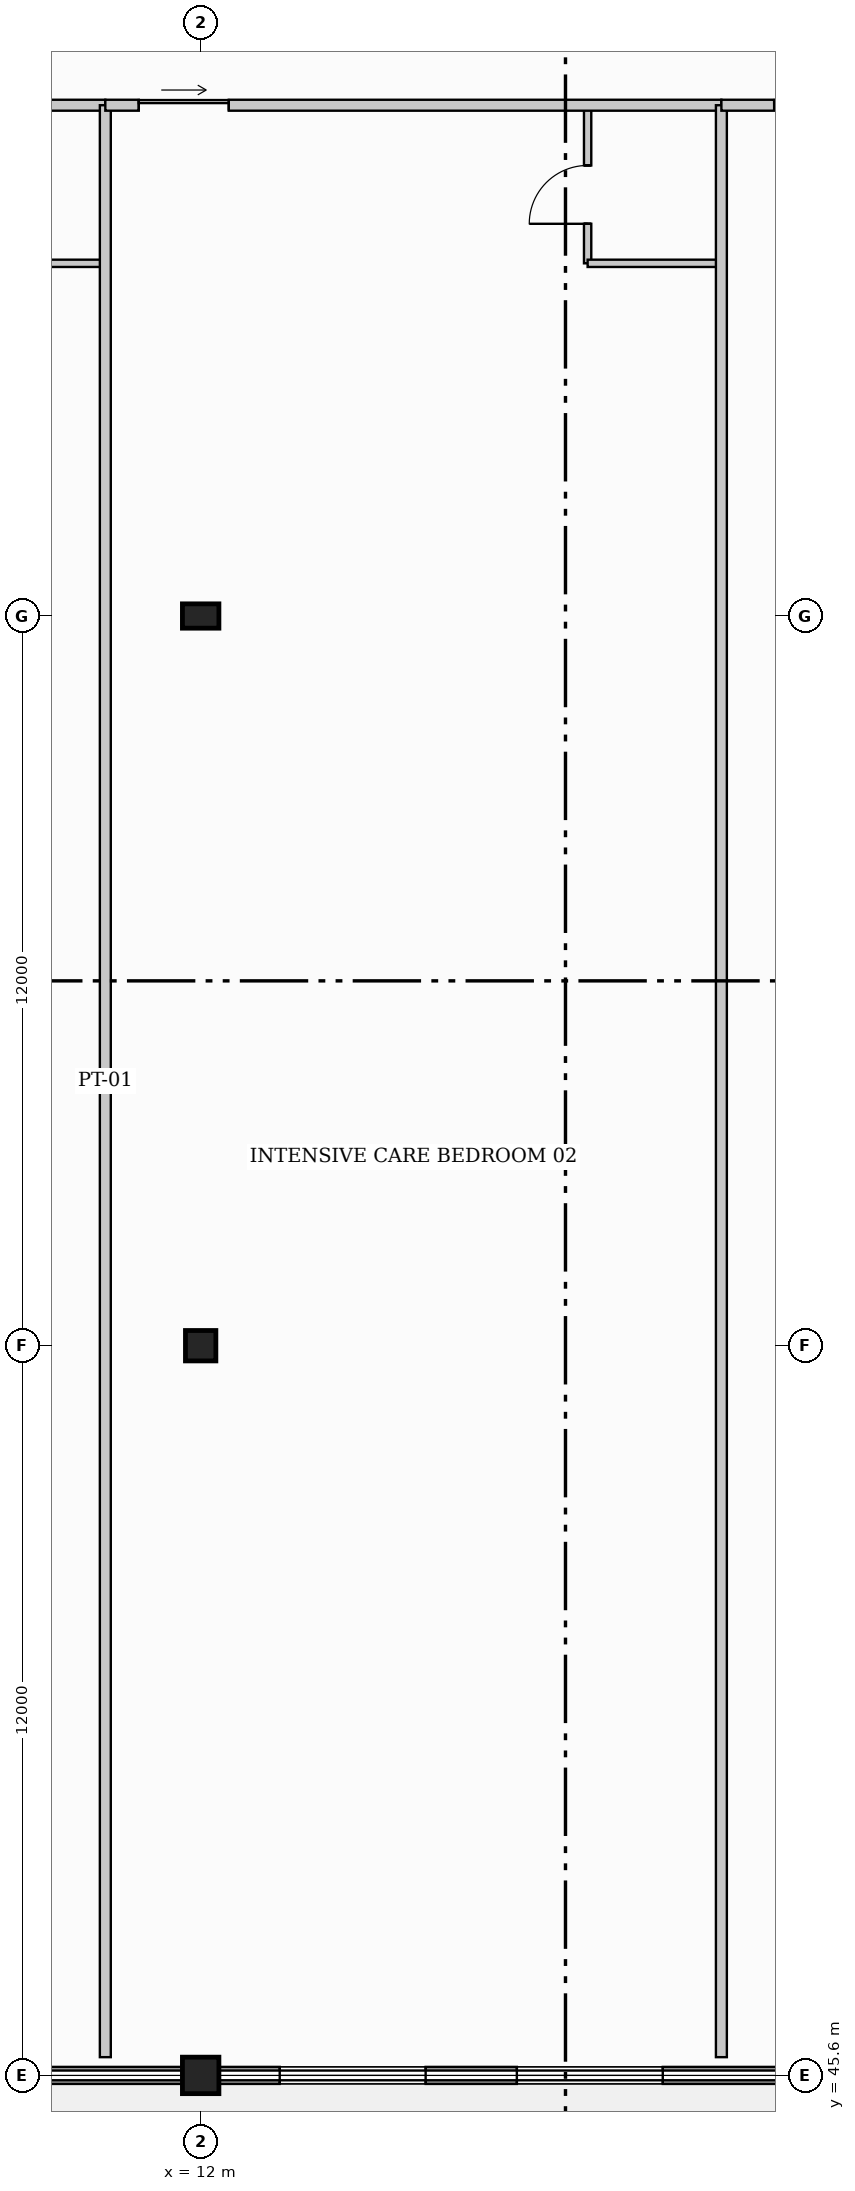
"""IFC4 building model, lengths in metres.
Left out: names, types, materials, properties, quantities, classifications, styles, units other than length and angle.
Written with IfcOpenShell. Run it as: python <this file> out.ifc"""

import sys

from ifc_helpers import new_model, si_unit, direction, frame, frame_2d, origin, origin_2d, place, context, subcontext, project, spatial, rectangle, extrude, element, fill, save


model = new_model("IFC4")
c1 = context("Model", 3, precision=1e-05, world=origin(), true_north=direction((0.0, 1.0)))
c2 = subcontext(c1, "Body", "Model", "MODEL_VIEW")
j1 = project(units=[si_unit("LENGTHUNIT", "METRE"), si_unit("PLANEANGLEUNIT", "RADIAN")], contexts=[c1])
p1 = place(None, origin())
s1 = spatial("IfcSite", under=j1, at=p1, CompositionType="ELEMENT")
p2 = place(p1, origin())
s2 = spatial("IfcBuilding", under=s1, at=p2, CompositionType="ELEMENT")
p3 = place(p2, frame((0.0, 0.0, 4.8)))
s3 = spatial("IfcBuildingStorey", under=s2, at=p3, CompositionType="ELEMENT", Elevation=4.8)
p4 = place(p3, frame((12.0, 45.6, 0.0), z_axis=(0.0, 0.0, 1.0), x_axis=(0.0, 1.0, 0.0)))
e1 = element("IfcColumn", 1, at=p4, inside=s3, PredefinedType="COLUMN", context=c2, shape_type="SweptSolid", body=[
    extrude(rectangle(XDim=0.6, YDim=0.6, at=origin_2d()), origin(), (0.0, 0.0, 1.0), 4.8),
])
p5 = place(p3, frame((12.0, 57.6, 0.0), z_axis=(0.0, 0.0, 1.0), x_axis=(0.0, 1.0, 0.0)))
e2 = element("IfcColumn", 2, at=p5, inside=s3, PredefinedType="COLUMN", context=c2, shape_type="SweptSolid", body=[
    extrude(rectangle(XDim=0.5, YDim=0.5, at=origin_2d()), origin(), (0.0, 0.0, 1.0), 4.8),
])
p6 = place(p3, frame((12.0, 69.6, 0.0), z_axis=(0.0, 0.0, 1.0), x_axis=(0.0, 1.0, 0.0)))
e3 = element("IfcColumn", 3, at=p6, inside=s3, PredefinedType="PILASTER", context=c2, shape_type="SweptSolid", body=[
    extrude(rectangle(XDim=0.4, YDim=0.6, at=origin_2d()), origin(), (0.0, 0.0, 1.0), 4.8),
])
p7 = place(p3, frame((48.0, 45.6, 0.0), z_axis=(0.0, 0.0, 1.0), x_axis=(-1.0, 0.0, 0.0)))
e4 = element("IfcWall", 4, at=p7, inside=s3, PredefinedType="STANDARD", context=c2, shape_type="SweptSolid", body=[
    extrude(rectangle(XDim=48.0, YDim=0.28, at=frame_2d((24.0, 0.0))), origin(), (0.0, 0.0, 1.0), 3.465),
])
p8 = place(p7, frame((1.1, 0.0, 0.95)))
e5 = element("IfcOpeningElement", 5, at=p8, cuts=e4, PredefinedType="OPENING", context=c2, shape_type="SweptSolid", body=[
    extrude(rectangle(XDim=2.4, YDim=1.5, at=frame_2d((1.2, 0.75))), frame((0.0, 0.15, 0.0), z_axis=(0.0, -1.0, 0.0), x_axis=(1.0, 0.0, 0.0)), (0.0, 0.0, 1.0), 0.3),
])
p9 = place(p7, frame((5.0, 0.0, 0.95)))
e6 = element("IfcOpeningElement", 6, at=p9, cuts=e4, PredefinedType="OPENING", context=c2, shape_type="SweptSolid", body=[
    extrude(rectangle(XDim=2.4, YDim=1.5, at=frame_2d((1.2, 0.75))), frame((0.0, 0.15, 0.0), z_axis=(0.0, -1.0, 0.0), x_axis=(1.0, 0.0, 0.0)), (0.0, 0.0, 1.0), 0.3),
])
p10 = place(p7, frame((16.7, 0.0, 0.95)))
e7 = element("IfcOpeningElement", 7, at=p10, cuts=e4, PredefinedType="OPENING", context=c2, shape_type="SweptSolid", body=[
    extrude(rectangle(XDim=2.4, YDim=1.5, at=frame_2d((1.2, 0.75))), frame((0.0, 0.15, 0.0), z_axis=(0.0, -1.0, 0.0), x_axis=(1.0, 0.0, 0.0)), (0.0, 0.0, 1.0), 0.3),
])
p11 = place(p7, frame((20.6, 0.0, 0.95)))
e8 = element("IfcOpeningElement", 8, at=p11, cuts=e4, PredefinedType="OPENING", context=c2, shape_type="SweptSolid", body=[
    extrude(rectangle(XDim=2.4, YDim=1.5, at=frame_2d((1.2, 0.75))), frame((0.0, 0.15, 0.0), z_axis=(0.0, -1.0, 0.0), x_axis=(1.0, 0.0, 0.0)), (0.0, 0.0, 1.0), 0.3),
])
p12 = place(p7, frame((28.4, 0.0, 0.95)))
e9 = element("IfcOpeningElement", 9, at=p12, cuts=e4, PredefinedType="OPENING", context=c2, shape_type="SweptSolid", body=[
    extrude(rectangle(XDim=2.4, YDim=1.5, at=frame_2d((1.2, 0.75))), frame((0.0, 0.15, 0.0), z_axis=(0.0, -1.0, 0.0), x_axis=(1.0, 0.0, 0.0)), (0.0, 0.0, 1.0), 0.3),
])
p13 = place(p7, frame((32.3, 0.0, 0.95)))
e10 = element("IfcOpeningElement", 10, at=p13, cuts=e4, PredefinedType="OPENING", context=c2, shape_type="SweptSolid", body=[
    extrude(rectangle(XDim=2.4, YDim=1.5, at=frame_2d((1.2, 0.75))), frame((0.0, 0.15, 0.0), z_axis=(0.0, -1.0, 0.0), x_axis=(1.0, 0.0, 0.0)), (0.0, 0.0, 1.0), 0.3),
])
p14 = place(p7, frame((40.1, 0.0, 0.95)))
e11 = element("IfcOpeningElement", 11, at=p14, cuts=e4, PredefinedType="OPENING", context=c2, shape_type="SweptSolid", body=[
    extrude(rectangle(XDim=2.4, YDim=1.5, at=frame_2d((1.2, 0.75))), frame((0.0, 0.15, 0.0), z_axis=(0.0, -1.0, 0.0), x_axis=(1.0, 0.0, 0.0)), (0.0, 0.0, 1.0), 0.3),
])
p15 = place(p7, frame((44.0, 0.0, 0.95)))
e12 = element("IfcOpeningElement", 12, at=p15, cuts=e4, PredefinedType="OPENING", context=c2, shape_type="SweptSolid", body=[
    extrude(rectangle(XDim=2.4, YDim=1.5, at=frame_2d((1.2, 0.75))), frame((0.0, 0.15, 0.0), z_axis=(0.0, -1.0, 0.0), x_axis=(1.0, 0.0, 0.0)), (0.0, 0.0, 1.0), 0.3),
])
p16 = place(p3, frame((8.232, 75.4, 0.0), z_axis=(0.0, 0.0, 1.0), x_axis=(1.0, 0.0, 0.0)))
e13 = element("IfcWall", 13, at=p16, inside=s3, PredefinedType="PARTITIONING", context=c2, shape_type="SweptSolid", body=[
    extrude(rectangle(XDim=2.2, YDim=0.12, at=frame_2d((1.1, 0.0))), origin(), (0.0, 0.0, 1.0), 4.43),
])
p17 = place(p3, frame((0.3, 78.0, 0.0), z_axis=(0.0, 0.0, 1.0), x_axis=(1.0, 0.0, 0.0)))
e14 = element("IfcWall", 14, at=p17, inside=s3, PredefinedType="PARTITIONING", context=c2, shape_type="SweptSolid", body=[
    extrude(rectangle(XDim=10.132, YDim=0.18, at=frame_2d((5.066, 0.0))), origin(), (0.0, 0.0, 1.0), 4.065),
])
p18 = place(p17, frame((0.55, 0.0, 0.0)))
e15 = element("IfcOpeningElement", 15, at=p18, cuts=e14, PredefinedType="OPENING", context=c2, shape_type="SweptSolid", body=[
    extrude(rectangle(XDim=1.48, YDim=2.26, at=frame_2d((0.74, 1.13))), frame((0.0, 0.1, 0.0), z_axis=(0.0, -1.0, 0.0), x_axis=(1.0, 0.0, 0.0)), (0.0, 0.0, 1.0), 0.2),
])
p19 = place(p3, frame((10.432, 45.9, 0.0), z_axis=(0.0, 0.0, 1.0), x_axis=(0.0, 1.0, 0.0)))
e16 = element("IfcWall", 16, at=p19, inside=s3, PredefinedType="PARTITIONING", context=c2, shape_type="SweptSolid", body=[
    extrude(rectangle(XDim=32.1, YDim=0.18, at=frame_2d((16.05, 0.0))), origin(), (0.0, 0.0, 1.0), 3.823),
])
p20 = place(p3, frame((18.364, 75.4, 0.0), z_axis=(0.0, 0.0, 1.0), x_axis=(0.0, 1.0, 0.0)))
e17 = element("IfcWall", 17, at=p20, inside=s3, PredefinedType="PARTITIONING", context=c2, shape_type="SweptSolid", body=[
    extrude(rectangle(XDim=2.6, YDim=0.12, at=frame_2d((1.3, 0.0))), origin(), (0.0, 0.0, 1.0), 4.163),
])
p21 = place(p20, frame((0.65, 0.0, 0.0)))
e18 = element("IfcOpeningElement", 18, at=p21, cuts=e17, PredefinedType="OPENING", context=c2, shape_type="SweptSolid", body=[
    extrude(rectangle(XDim=0.96, YDim=2.06, at=frame_2d((0.48, 1.03))), frame((0.0, 0.07, 0.0), z_axis=(0.0, -1.0, 0.0), x_axis=(1.0, 0.0, 0.0)), (0.0, 0.0, 1.0), 0.14),
])
p22 = place(p3, frame((18.364, 75.4, 0.0), z_axis=(0.0, 0.0, 1.0), x_axis=(1.0, 0.0, 0.0)))
e19 = element("IfcWall", 19, at=p22, inside=s3, PredefinedType="PARTITIONING", context=c2, shape_type="SweptSolid", body=[
    extrude(rectangle(XDim=2.2, YDim=0.12, at=frame_2d((1.1, 0.0))), origin(), (0.0, 0.0, 1.0), 4.43),
])
p23 = place(p3, frame((10.432, 78.0, 0.0), z_axis=(0.0, 0.0, 1.0), x_axis=(1.0, 0.0, 0.0)))
e20 = element("IfcWall", 20, at=p23, inside=s3, PredefinedType="PARTITIONING", context=c2, shape_type="SweptSolid", body=[
    extrude(rectangle(XDim=10.132, YDim=0.18, at=frame_2d((5.066, 0.0))), origin(), (0.0, 0.0, 1.0), 3.465),
])
p24 = place(p23, frame((0.55, 0.0, 0.0)))
e21 = element("IfcOpeningElement", 21, at=p24, cuts=e20, PredefinedType="OPENING", context=c2, shape_type="SweptSolid", body=[
    extrude(rectangle(XDim=1.48, YDim=2.26, at=frame_2d((0.74, 1.13))), frame((0.0, 0.1, 0.0), z_axis=(0.0, -1.0, 0.0), x_axis=(1.0, 0.0, 0.0)), (0.0, 0.0, 1.0), 0.2),
])
p25 = place(p3, frame((20.564, 45.9, 0.0), z_axis=(0.0, 0.0, 1.0), x_axis=(0.0, 1.0, 0.0)))
e22 = element("IfcWall", 22, at=p25, inside=s3, PredefinedType="PARTITIONING", context=c2, shape_type="SweptSolid", body=[
    extrude(rectangle(XDim=32.1, YDim=0.18, at=frame_2d((16.05, 0.0))), origin(), (0.0, 0.0, 1.0), 3.887),
])
p26 = place(p3, frame((20.564, 78.0, 0.0), z_axis=(0.0, 0.0, 1.0), x_axis=(1.0, 0.0, 0.0)))
e23 = element("IfcWall", 23, at=p26, inside=s3, PredefinedType="PARTITIONING", context=c2, shape_type="SweptSolid", body=[
    extrude(rectangle(XDim=3.036, YDim=0.18, at=frame_2d((1.518, 0.0))), origin(), (0.0, 0.0, 1.0), 4.43),
])
p27 = place(p26, frame((0.868, 0.0, 0.0)))
e24 = element("IfcOpeningElement", 24, at=p27, cuts=e23, PredefinedType="OPENING", context=c2, shape_type="SweptSolid", body=[
    extrude(rectangle(XDim=1.48, YDim=2.26, at=frame_2d((0.74, 1.13))), frame((0.0, 0.1, 0.0), z_axis=(0.0, -1.0, 0.0), x_axis=(1.0, 0.0, 0.0)), (0.0, 0.0, 1.0), 0.2),
])
p28 = place(p12, origin())
e25 = element("IfcWindow", 25, at=p28, inside=s3, PartitioningType="TRIPLE_PANEL_VERTICAL", PredefinedType="WINDOW", context=c2, shape_type="SweptSolid", body=[
    extrude(rectangle(XDim=2.4, YDim=1.5, at=frame_2d((1.2, 0.75))), frame((0.0, 0.03, 0.0), z_axis=(0.0, -1.0, 0.0), x_axis=(1.0, 0.0, 0.0)), (0.0, 0.0, 1.0), 0.06),
])
fill(e9, e25)
p29 = place(p13, origin())
e26 = element("IfcWindow", 26, at=p29, inside=s3, PartitioningType="TRIPLE_PANEL_VERTICAL", PredefinedType="WINDOW", context=c2, shape_type="SweptSolid", body=[
    extrude(rectangle(XDim=2.4, YDim=1.5, at=frame_2d((1.2, 0.75))), frame((0.0, 0.03, 0.0), z_axis=(0.0, -1.0, 0.0), x_axis=(1.0, 0.0, 0.0)), (0.0, 0.0, 1.0), 0.06),
])
fill(e10, e26)
p30 = place(p21, origin())
e27 = element("IfcDoor", 27, at=p30, inside=s3, OperationType="SINGLE_SWING_LEFT", PredefinedType="DOOR", context=c2, shape_type="SweptSolid", body=[
    extrude(rectangle(XDim=0.96, YDim=2.06, at=frame_2d((0.48, 1.03))), frame((0.0, 0.025, 0.0), z_axis=(0.0, -1.0, 0.0), x_axis=(1.0, 0.0, 0.0)), (0.0, 0.0, 1.0), 0.05),
])
fill(e18, e27)
p31 = place(p24, origin())
e28 = element("IfcDoor", 28, at=p31, inside=s3, OperationType="SLIDING_TO_LEFT", PredefinedType="DOOR", context=c2, shape_type="SweptSolid", body=[
    extrude(rectangle(XDim=1.48, YDim=2.26, at=frame_2d((0.74, 1.13))), frame((0.0, 0.025, 0.0), z_axis=(0.0, -1.0, 0.0), x_axis=(1.0, 0.0, 0.0)), (0.0, 0.0, 1.0), 0.05),
])
fill(e21, e28)
p32 = place(p27, origin())
e29 = element("IfcDoor", 29, at=p32, inside=s3, OperationType="SLIDING_TO_LEFT", PredefinedType="DOOR", context=c2, shape_type="SweptSolid", body=[
    extrude(rectangle(XDim=1.48, YDim=2.26, at=frame_2d((0.74, 1.13))), frame((0.0, 0.025, 0.0), z_axis=(0.0, -1.0, 0.0), x_axis=(1.0, 0.0, 0.0)), (0.0, 0.0, 1.0), 0.05),
])
fill(e24, e29)
save(model, sys.argv[1])
